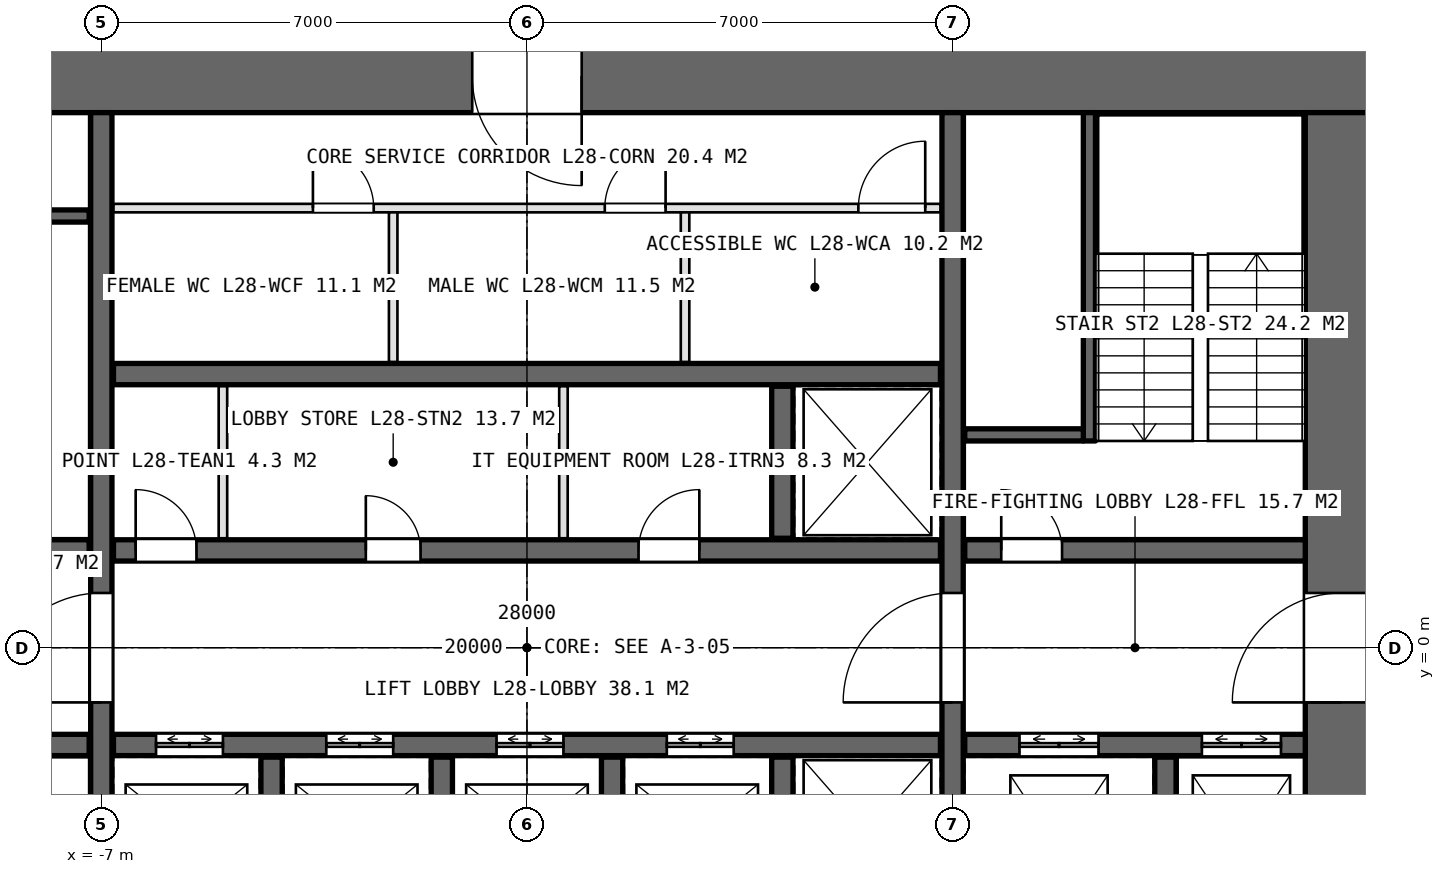
"""IFC4 building model, lengths in metres.
Left out: names, types, materials, properties, quantities, classifications, styles, units other than length and angle.
Written with IfcOpenShell. Run it as: python <this file> out.ifc"""

import sys

from ifc_helpers import new_model, si_unit, direction, frame, frame_2d, origin, place, context, subcontext, project, spatial, rectangle, extrude, element, fill, save


model = new_model("IFC4")
c1 = context("Model", 3, precision=1e-05, world=origin(), true_north=direction((0.0, 1.0)))
c2 = subcontext(c1, "Body", "Model", "MODEL_VIEW")
j1 = project(units=[si_unit("LENGTHUNIT", "METRE"), si_unit("PLANEANGLEUNIT", "RADIAN")], contexts=[c1])
p1 = place(None, origin())
s1 = spatial("IfcSite", under=j1, at=p1, CompositionType="ELEMENT")
p2 = place(p1, origin())
s2 = spatial("IfcBuilding", under=s1, at=p2, CompositionType="ELEMENT")
p3 = place(p2, frame((0.0, 0.0, 134.4)))
s3 = spatial("IfcBuildingStorey", under=s2, at=p3, CompositionType="ELEMENT", Elevation=134.4)
p4 = place(p3, frame((14.0, 9.4, 0.0), z_axis=(0.0, 0.0, 1.0), x_axis=(-1.0, 0.0, 0.0)))
e1 = element("IfcWall", 1, at=p4, inside=s3, PredefinedType="SHEAR", context=c2, shape_type="SweptSolid", body=[
    extrude(rectangle(XDim=28.0, YDim=1.2, at=frame_2d((14.0, 0.0))), origin(), (0.0, 0.0, 1.0), 4.2),
])
p5 = place(p4, frame((24.0, 0.0, 0.0)))
e2 = element("IfcOpeningElement", 2, at=p5, cuts=e1, PredefinedType="OPENING", context=c2, shape_type="SweptSolid", body=[
    extrude(rectangle(XDim=1.0, YDim=2.4, at=frame_2d((0.5, 1.2))), frame((0.0, 0.61, 0.0), z_axis=(0.0, -1.0, 0.0), x_axis=(1.0, 0.0, 0.0)), (0.0, 0.0, 1.0), 1.22),
])
p6 = place(p4, frame((13.1, 0.0, 0.0)))
e3 = element("IfcOpeningElement", 3, at=p6, cuts=e1, PredefinedType="OPENING", context=c2, shape_type="SweptSolid", body=[
    extrude(rectangle(XDim=1.8, YDim=2.4, at=frame_2d((0.9, 1.2))), frame((0.0, 0.61, 0.0), z_axis=(0.0, -1.0, 0.0), x_axis=(1.0, 0.0, 0.0)), (0.0, 0.0, 1.0), 1.22),
])
p7 = place(p3, frame((13.4, -8.8, 0.0), z_axis=(0.0, 0.0, 1.0), x_axis=(0.0, 1.0, 0.0)))
e4 = element("IfcWall", 4, at=p7, inside=s3, PredefinedType="SHEAR", context=c2, shape_type="SweptSolid", body=[
    extrude(rectangle(XDim=17.6, YDim=1.2, at=frame_2d((8.8, 0.0))), origin(), (0.0, 0.0, 1.0), 4.2),
])
p8 = place(p7, frame((7.9, 0.0, 0.0)))
e5 = element("IfcOpeningElement", 5, at=p8, cuts=e4, PredefinedType="OPENING", context=c2, shape_type="SweptSolid", body=[
    extrude(rectangle(XDim=1.8, YDim=2.4, at=frame_2d((0.9, 1.2))), frame((0.0, 0.61, 0.0), z_axis=(0.0, -1.0, 0.0), x_axis=(1.0, 0.0, 0.0)), (0.0, 0.0, 1.0), 1.22),
])
p9 = place(p3, frame((-7.0, -8.8, 0.0), z_axis=(0.0, 0.0, 1.0), x_axis=(0.0, 1.0, 0.0)))
e6 = element("IfcWall", 6, at=p9, inside=s3, PredefinedType="SHEAR", context=c2, shape_type="SweptSolid", body=[
    extrude(rectangle(XDim=17.6, YDim=0.35, at=frame_2d((8.8, 0.0))), origin(), (0.0, 0.0, 1.0), 4.2),
])
p10 = place(p9, frame((7.9, 0.0, 0.0)))
e7 = element("IfcOpeningElement", 7, at=p10, cuts=e6, PredefinedType="OPENING", context=c2, shape_type="SweptSolid", body=[
    extrude(rectangle(XDim=1.8, YDim=2.4, at=frame_2d((0.9, 1.2))), frame((0.0, 0.185, 0.0), z_axis=(0.0, -1.0, 0.0), x_axis=(1.0, 0.0, 0.0)), (0.0, 0.0, 1.0), 0.37),
])
p11 = place(p3, frame((7.0, -8.8, 0.0), z_axis=(0.0, 0.0, 1.0), x_axis=(0.0, 1.0, 0.0)))
e8 = element("IfcWall", 8, at=p11, inside=s3, PredefinedType="SHEAR", context=c2, shape_type="SweptSolid", body=[
    extrude(rectangle(XDim=17.6, YDim=0.35, at=frame_2d((8.8, 0.0))), origin(), (0.0, 0.0, 1.0), 4.2),
])
p12 = place(p11, frame((7.9, 0.0, 0.0)))
e9 = element("IfcOpeningElement", 9, at=p12, cuts=e8, PredefinedType="OPENING", context=c2, shape_type="SweptSolid", body=[
    extrude(rectangle(XDim=1.8, YDim=2.4, at=frame_2d((0.9, 1.2))), frame((0.0, 0.185, 0.0), z_axis=(0.0, -1.0, 0.0), x_axis=(1.0, 0.0, 0.0)), (0.0, 0.0, 1.0), 0.37),
])
p13 = place(p3, frame((-6.8, 1.6, 0.0), z_axis=(0.0, 0.0, 1.0), x_axis=(1.0, 0.0, 0.0)))
e10 = element("IfcWall", 10, at=p13, inside=s3, PredefinedType="SHEAR", context=c2, shape_type="SweptSolid", body=[
    extrude(rectangle(XDim=13.6, YDim=0.35, at=frame_2d((6.8, 0.0))), origin(), (0.0, 0.0, 1.0), 4.2),
])
p14 = place(p13, frame((0.365, 0.0, 0.0)))
e11 = element("IfcOpeningElement", 11, at=p14, cuts=e10, PredefinedType="OPENING", context=c2, shape_type="SweptSolid", body=[
    extrude(rectangle(XDim=1.0, YDim=2.4, at=frame_2d((0.5, 1.2))), frame((0.0, 0.185, 0.0), z_axis=(0.0, -1.0, 0.0), x_axis=(1.0, 0.0, 0.0)), (0.0, 0.0, 1.0), 0.37),
])
p15 = place(p13, frame((4.15, 0.0, 0.0)))
e12 = element("IfcOpeningElement", 12, at=p15, cuts=e10, PredefinedType="OPENING", context=c2, shape_type="SweptSolid", body=[
    extrude(rectangle(XDim=0.9, YDim=2.4, at=frame_2d((0.45, 1.2))), frame((0.0, 0.185, 0.0), z_axis=(0.0, -1.0, 0.0), x_axis=(1.0, 0.0, 0.0)), (0.0, 0.0, 1.0), 0.37),
])
p16 = place(p13, frame((8.635, 0.0, 0.0)))
e13 = element("IfcOpeningElement", 13, at=p16, cuts=e10, PredefinedType="OPENING", context=c2, shape_type="SweptSolid", body=[
    extrude(rectangle(XDim=1.0, YDim=2.4, at=frame_2d((0.5, 1.2))), frame((0.0, 0.185, 0.0), z_axis=(0.0, -1.0, 0.0), x_axis=(1.0, 0.0, 0.0)), (0.0, 0.0, 1.0), 0.37),
])
p17 = place(p3, frame((-6.8, -1.6, 0.0), z_axis=(0.0, 0.0, 1.0), x_axis=(1.0, 0.0, 0.0)))
e14 = element("IfcWall", 14, at=p17, inside=s3, PredefinedType="SHEAR", context=c2, shape_type="SweptSolid", body=[
    extrude(rectangle(XDim=13.6, YDim=0.35, at=frame_2d((6.8, 0.0))), origin(), (0.0, 0.0, 1.0), 4.2),
])
p18 = place(p17, frame((0.7, 0.0, 0.0)))
e15 = element("IfcOpeningElement", 15, at=p18, cuts=e14, PredefinedType="OPENING", context=c2, shape_type="SweptSolid", body=[
    extrude(rectangle(XDim=1.1, YDim=2.4, at=frame_2d((0.55, 1.2))), frame((0.0, 0.185, 0.0), z_axis=(0.0, -1.0, 0.0), x_axis=(1.0, 0.0, 0.0)), (0.0, 0.0, 1.0), 0.37),
])
p19 = place(p17, frame((3.5, 0.0, 0.0)))
e16 = element("IfcOpeningElement", 16, at=p19, cuts=e14, PredefinedType="OPENING", context=c2, shape_type="SweptSolid", body=[
    extrude(rectangle(XDim=1.1, YDim=2.4, at=frame_2d((0.55, 1.2))), frame((0.0, 0.185, 0.0), z_axis=(0.0, -1.0, 0.0), x_axis=(1.0, 0.0, 0.0)), (0.0, 0.0, 1.0), 0.37),
])
p20 = place(p17, frame((6.3, 0.0, 0.0)))
e17 = element("IfcOpeningElement", 17, at=p20, cuts=e14, PredefinedType="OPENING", context=c2, shape_type="SweptSolid", body=[
    extrude(rectangle(XDim=1.1, YDim=2.4, at=frame_2d((0.55, 1.2))), frame((0.0, 0.185, 0.0), z_axis=(0.0, -1.0, 0.0), x_axis=(1.0, 0.0, 0.0)), (0.0, 0.0, 1.0), 0.37),
])
p21 = place(p17, frame((9.1, 0.0, 0.0)))
e18 = element("IfcOpeningElement", 18, at=p21, cuts=e14, PredefinedType="OPENING", context=c2, shape_type="SweptSolid", body=[
    extrude(rectangle(XDim=1.1, YDim=2.4, at=frame_2d((0.55, 1.2))), frame((0.0, 0.185, 0.0), z_axis=(0.0, -1.0, 0.0), x_axis=(1.0, 0.0, 0.0)), (0.0, 0.0, 1.0), 0.37),
])
p22 = place(p3, frame((-6.8, 4.5, 0.0), z_axis=(0.0, 0.0, 1.0), x_axis=(1.0, 0.0, 0.0)))
e19 = element("IfcWall", 19, at=p22, inside=s3, PredefinedType="SHEAR", context=c2, shape_type="SweptSolid", body=[
    extrude(rectangle(XDim=13.6, YDim=0.35, at=frame_2d((6.8, 0.0))), origin(), (0.0, 0.0, 1.0), 4.2),
])
for number, where, z_axis, x_axis in (
    (20, (-12.8, 1.6, 0.0), (0.0, 0.0, 1.0), (1.0, 0.0, 0.0)),
    (21, (-12.8, -1.6, 0.0), (0.0, 0.0, 1.0), (1.0, 0.0, 0.0)),
):
    element("IfcWall", number, at=place(p3, frame(where, z_axis=z_axis, x_axis=x_axis)), inside=s3, PredefinedType="SHEAR", context=c2, shape_type="SweptSolid", body=[
        extrude(rectangle(XDim=5.6, YDim=0.35, at=frame_2d((2.8, 0.0))), origin(), (0.0, 0.0, 1.0), 4.2),
    ])
p23 = place(p3, frame((7.2, 1.6, 0.0), z_axis=(0.0, 0.0, 1.0), x_axis=(1.0, 0.0, 0.0)))
e22 = element("IfcWall", 22, at=p23, inside=s3, PredefinedType="SHEAR", context=c2, shape_type="SweptSolid", body=[
    extrude(rectangle(XDim=5.6, YDim=0.35, at=frame_2d((2.8, 0.0))), origin(), (0.0, 0.0, 1.0), 4.2),
])
p24 = place(p23, frame((0.6, 0.0, 0.0)))
e23 = element("IfcOpeningElement", 23, at=p24, cuts=e22, PredefinedType="OPENING", context=c2, shape_type="SweptSolid", body=[
    extrude(rectangle(XDim=1.0, YDim=2.4, at=frame_2d((0.5, 1.2))), frame((0.0, 0.185, 0.0), z_axis=(0.0, -1.0, 0.0), x_axis=(1.0, 0.0, 0.0)), (0.0, 0.0, 1.0), 0.37),
])
p25 = place(p3, frame((7.2, -1.6, 0.0), z_axis=(0.0, 0.0, 1.0), x_axis=(1.0, 0.0, 0.0)))
e24 = element("IfcWall", 24, at=p25, inside=s3, PredefinedType="SHEAR", context=c2, shape_type="SweptSolid", body=[
    extrude(rectangle(XDim=5.6, YDim=0.35, at=frame_2d((2.8, 0.0))), origin(), (0.0, 0.0, 1.0), 4.2),
])
p26 = place(p25, frame((0.9, 0.0, 0.0)))
e25 = element("IfcOpeningElement", 25, at=p26, cuts=e24, PredefinedType="OPENING", context=c2, shape_type="SweptSolid", body=[
    extrude(rectangle(XDim=1.3, YDim=2.4, at=frame_2d((0.65, 1.2))), frame((0.0, 0.185, 0.0), z_axis=(0.0, -1.0, 0.0), x_axis=(1.0, 0.0, 0.0)), (0.0, 0.0, 1.0), 0.37),
])
p27 = place(p25, frame((3.9, 0.0, 0.0)))
e26 = element("IfcOpeningElement", 26, at=p27, cuts=e24, PredefinedType="OPENING", context=c2, shape_type="SweptSolid", body=[
    extrude(rectangle(XDim=1.3, YDim=2.4, at=frame_2d((0.65, 1.2))), frame((0.0, 0.185, 0.0), z_axis=(0.0, -1.0, 0.0), x_axis=(1.0, 0.0, 0.0)), (0.0, 0.0, 1.0), 0.37),
])
p28 = place(p3, frame((10.5, -4.8, 0.0), z_axis=(0.0, 0.0, 1.0), x_axis=(0.0, 1.0, 0.0)))
e27 = element("IfcWall", 27, at=p28, inside=s3, PredefinedType="SHEAR", context=c2, shape_type="SweptSolid", body=[
    extrude(rectangle(XDim=3.0, YDim=0.35, at=frame_2d((1.5, 0.0))), origin(), (0.0, 0.0, 1.0), 4.2),
])
for number, where, z_axis, x_axis in (
    (28, (-4.2, -4.3, 0.0), (0.0, 0.0, 1.0), (0.0, 1.0, 0.0)),
    (29, (-1.4, -4.3, 0.0), (0.0, 0.0, 1.0), (0.0, 1.0, 0.0)),
    (30, (1.4, -4.3, 0.0), (0.0, 0.0, 1.0), (0.0, 1.0, 0.0)),
    (31, (4.2, 1.8, 0.0), (0.0, 0.0, 1.0), (0.0, 1.0, 0.0)),
    (32, (4.2, -4.3, 0.0), (0.0, 0.0, 1.0), (0.0, 1.0, 0.0)),
):
    element("IfcWall", number, at=place(p3, frame(where, z_axis=z_axis, x_axis=x_axis)), inside=s3, PredefinedType="SHEAR", context=c2, shape_type="SweptSolid", body=[
        extrude(rectangle(XDim=2.5, YDim=0.35, at=frame_2d((1.25, 0.0))), origin(), (0.0, 0.0, 1.0), 4.2),
    ])
p29 = place(p3, frame((-6.8, 7.23, 0.0), z_axis=(0.0, 0.0, 1.0), x_axis=(1.0, 0.0, 0.0)))
e33 = element("IfcWall", 33, at=p29, inside=s3, PredefinedType="PARTITIONING", context=c2, shape_type="SweptSolid", body=[
    extrude(rectangle(XDim=13.6, YDim=0.14, at=frame_2d((6.8, 0.0))), origin(), (0.0, 0.0, 1.0), 3.95),
])
p30 = place(p29, frame((3.28, 0.0, 0.0)))
e34 = element("IfcOpeningElement", 34, at=p30, cuts=e33, PredefinedType="OPENING", context=c2, shape_type="SweptSolid", body=[
    extrude(rectangle(XDim=1.0, YDim=2.4, at=frame_2d((0.5, 1.2))), frame((0.0, 0.08, 0.0), z_axis=(0.0, -1.0, 0.0), x_axis=(1.0, 0.0, 0.0)), (0.0, 0.0, 1.0), 0.16),
])
p31 = place(p29, frame((8.08, 0.0, 0.0)))
e35 = element("IfcOpeningElement", 35, at=p31, cuts=e33, PredefinedType="OPENING", context=c2, shape_type="SweptSolid", body=[
    extrude(rectangle(XDim=1.0, YDim=2.4, at=frame_2d((0.5, 1.2))), frame((0.0, 0.08, 0.0), z_axis=(0.0, -1.0, 0.0), x_axis=(1.0, 0.0, 0.0)), (0.0, 0.0, 1.0), 0.16),
])
p32 = place(p29, frame((12.25, 0.0, 0.0)))
e36 = element("IfcOpeningElement", 36, at=p32, cuts=e33, PredefinedType="OPENING", context=c2, shape_type="SweptSolid", body=[
    extrude(rectangle(XDim=1.1, YDim=2.4, at=frame_2d((0.55, 1.2))), frame((0.0, 0.08, 0.0), z_axis=(0.0, -1.0, 0.0), x_axis=(1.0, 0.0, 0.0)), (0.0, 0.0, 1.0), 0.16),
])
for number, where, z_axis, x_axis in (
    (37, (-2.2, 4.7, 0.0), (0.0, 0.0, 1.0), (0.0, 1.0, 0.0)),
    (38, (2.6, 4.7, 0.0), (0.0, 0.0, 1.0), (0.0, 1.0, 0.0)),
):
    element("IfcWall", number, at=place(p3, frame(where, z_axis=z_axis, x_axis=x_axis)), inside=s3, PredefinedType="PARTITIONING", context=c2, shape_type="SweptSolid", body=[
        extrude(rectangle(XDim=2.46, YDim=0.14, at=frame_2d((1.23, 0.0))), origin(), (0.0, 0.0, 1.0), 3.95),
    ])
for number, where, z_axis, x_axis in (
    (39, (-5.0, 1.8, 0.0), (0.0, 0.0, 1.0), (0.0, 1.0, 0.0)),
    (40, (0.6, 1.8, 0.0), (0.0, 0.0, 1.0), (0.0, 1.0, 0.0)),
):
    element("IfcWall", number, at=place(p3, frame(where, z_axis=z_axis, x_axis=x_axis)), inside=s3, PredefinedType="PARTITIONING", context=c2, shape_type="SweptSolid", body=[
        extrude(rectangle(XDim=2.5, YDim=0.14, at=frame_2d((1.25, 0.0))), origin(), (0.0, 0.0, 1.0), 3.95),
    ])
p33 = place(p3, frame((-9.15, 7.1, 0.0), z_axis=(0.0, 0.0, 1.0), x_axis=(1.0, 0.0, 0.0)))
e41 = element("IfcWall", 41, at=p33, inside=s3, PredefinedType="SOLIDWALL", context=c2, shape_type="SweptSolid", body=[
    extrude(rectangle(XDim=1.95, YDim=0.2, at=frame_2d((0.975, 0.0))), origin(), (0.0, 0.0, 1.0), 4.2),
])
p34 = place(p3, frame((9.25, 3.4, 0.0), z_axis=(0.0, 0.0, 1.0), x_axis=(0.0, 1.0, 0.0)))
e42 = element("IfcWall", 42, at=p34, inside=s3, PredefinedType="SOLIDWALL", context=c2, shape_type="SweptSolid", body=[
    extrude(rectangle(XDim=5.4, YDim=0.2, at=frame_2d((2.7, 0.0))), origin(), (0.0, 0.0, 1.0), 4.2),
])
p35 = place(p3, frame((9.15, 3.5, 0.0), z_axis=(0.0, 0.0, 1.0), x_axis=(-1.0, 0.0, 0.0)))
e43 = element("IfcWall", 43, at=p35, inside=s3, PredefinedType="SOLIDWALL", context=c2, shape_type="SweptSolid", body=[
    extrude(rectangle(XDim=1.95, YDim=0.2, at=frame_2d((0.975, 0.0))), origin(), (0.0, 0.0, 1.0), 4.2),
])
p36 = place(p8, origin())
e44 = element("IfcDoor", 44, at=p36, inside=s3, OperationType="DOUBLE_DOOR_SINGLE_SWING", PredefinedType="DOOR", context=c2, shape_type="SweptSolid", body=[
    extrude(rectangle(XDim=1.8, YDim=2.4, at=frame_2d((0.9, 1.2))), frame((0.0, 0.025, 0.0), z_axis=(0.0, -1.0, 0.0), x_axis=(1.0, 0.0, 0.0)), (0.0, 0.0, 1.0), 0.05),
])
fill(e5, e44)
p37 = place(p10, origin())
e45 = element("IfcDoor", 45, at=p37, inside=s3, OperationType="DOUBLE_DOOR_SINGLE_SWING", PredefinedType="DOOR", context=c2, shape_type="SweptSolid", body=[
    extrude(rectangle(XDim=1.8, YDim=2.4, at=frame_2d((0.9, 1.2))), frame((0.0, 0.025, 0.0), z_axis=(0.0, -1.0, 0.0), x_axis=(1.0, 0.0, 0.0)), (0.0, 0.0, 1.0), 0.05),
])
fill(e7, e45)
p38 = place(p12, origin())
e46 = element("IfcDoor", 46, at=p38, inside=s3, OperationType="DOUBLE_DOOR_SINGLE_SWING", PredefinedType="DOOR", context=c2, shape_type="SweptSolid", body=[
    extrude(rectangle(XDim=1.8, YDim=2.4, at=frame_2d((0.9, 1.2))), frame((0.0, 0.025, 0.0), z_axis=(0.0, -1.0, 0.0), x_axis=(1.0, 0.0, 0.0)), (0.0, 0.0, 1.0), 0.05),
])
fill(e9, e46)
p39 = place(p24, origin())
e47 = element("IfcDoor", 47, at=p39, inside=s3, OperationType="SINGLE_SWING_LEFT", PredefinedType="DOOR", context=c2, shape_type="SweptSolid", body=[
    extrude(rectangle(XDim=1.0, YDim=2.4, at=frame_2d((0.5, 1.2))), frame((0.0, 0.025, 0.0), z_axis=(0.0, -1.0, 0.0), x_axis=(1.0, 0.0, 0.0)), (0.0, 0.0, 1.0), 0.05),
])
fill(e23, e47)
p40 = place(p30, origin())
e48 = element("IfcDoor", 48, at=p40, inside=s3, OperationType="SINGLE_SWING_LEFT", PredefinedType="DOOR", context=c2, shape_type="SweptSolid", body=[
    extrude(rectangle(XDim=1.0, YDim=2.4, at=frame_2d((0.5, 1.2))), frame((0.0, 0.025, 0.0), z_axis=(0.0, -1.0, 0.0), x_axis=(1.0, 0.0, 0.0)), (0.0, 0.0, 1.0), 0.05),
])
fill(e34, e48)
p41 = place(p31, origin())
e49 = element("IfcDoor", 49, at=p41, inside=s3, OperationType="SINGLE_SWING_RIGHT", PredefinedType="DOOR", context=c2, shape_type="SweptSolid", body=[
    extrude(rectangle(XDim=1.0, YDim=2.4, at=frame_2d((0.5, 1.2))), frame((0.0, 0.025, 0.0), z_axis=(0.0, -1.0, 0.0), x_axis=(1.0, 0.0, 0.0)), (0.0, 0.0, 1.0), 0.05),
])
fill(e35, e49)
p42 = place(p32, origin())
e50 = element("IfcDoor", 50, at=p42, inside=s3, OperationType="SINGLE_SWING_RIGHT", PredefinedType="DOOR", context=c2, shape_type="SweptSolid", body=[
    extrude(rectangle(XDim=1.1, YDim=2.4, at=frame_2d((0.55, 1.2))), frame((0.0, 0.025, 0.0), z_axis=(0.0, -1.0, 0.0), x_axis=(1.0, 0.0, 0.0)), (0.0, 0.0, 1.0), 0.05),
])
fill(e36, e50)
p43 = place(p14, origin())
e51 = element("IfcDoor", 51, at=p43, inside=s3, OperationType="SINGLE_SWING_LEFT", PredefinedType="DOOR", context=c2, shape_type="SweptSolid", body=[
    extrude(rectangle(XDim=1.0, YDim=2.4, at=frame_2d((0.5, 1.2))), frame((0.0, 0.025, 0.0), z_axis=(0.0, -1.0, 0.0), x_axis=(1.0, 0.0, 0.0)), (0.0, 0.0, 1.0), 0.05),
])
fill(e11, e51)
p44 = place(p15, origin())
e52 = element("IfcDoor", 52, at=p44, inside=s3, OperationType="SINGLE_SWING_LEFT", PredefinedType="DOOR", context=c2, shape_type="SweptSolid", body=[
    extrude(rectangle(XDim=0.9, YDim=2.4, at=frame_2d((0.45, 1.2))), frame((0.0, 0.025, 0.0), z_axis=(0.0, -1.0, 0.0), x_axis=(1.0, 0.0, 0.0)), (0.0, 0.0, 1.0), 0.05),
])
fill(e12, e52)
p45 = place(p16, origin())
e53 = element("IfcDoor", 53, at=p45, inside=s3, OperationType="SINGLE_SWING_RIGHT", PredefinedType="DOOR", context=c2, shape_type="SweptSolid", body=[
    extrude(rectangle(XDim=1.0, YDim=2.4, at=frame_2d((0.5, 1.2))), frame((0.0, 0.025, 0.0), z_axis=(0.0, -1.0, 0.0), x_axis=(1.0, 0.0, 0.0)), (0.0, 0.0, 1.0), 0.05),
])
fill(e13, e53)
p46 = place(p6, origin())
e54 = element("IfcDoor", 54, at=p46, inside=s3, OperationType="DOUBLE_DOOR_SINGLE_SWING", PredefinedType="DOOR", context=c2, shape_type="SweptSolid", body=[
    extrude(rectangle(XDim=1.8, YDim=2.4, at=frame_2d((0.9, 1.2))), frame((0.0, 0.025, 0.0), z_axis=(0.0, -1.0, 0.0), x_axis=(1.0, 0.0, 0.0)), (0.0, 0.0, 1.0), 0.05),
])
fill(e3, e54)
p47 = place(p18, origin())
e55 = element("IfcDoor", 55, at=p47, inside=s3, OperationType="DOUBLE_DOOR_SLIDING", PredefinedType="DOOR", context=c2, shape_type="SweptSolid", body=[
    extrude(rectangle(XDim=1.1, YDim=2.4, at=frame_2d((0.55, 1.2))), frame((0.0, 0.025, 0.0), z_axis=(0.0, -1.0, 0.0), x_axis=(1.0, 0.0, 0.0)), (0.0, 0.0, 1.0), 0.05),
])
fill(e15, e55)
p48 = place(p19, origin())
e56 = element("IfcDoor", 56, at=p48, inside=s3, OperationType="DOUBLE_DOOR_SLIDING", PredefinedType="DOOR", context=c2, shape_type="SweptSolid", body=[
    extrude(rectangle(XDim=1.1, YDim=2.4, at=frame_2d((0.55, 1.2))), frame((0.0, 0.025, 0.0), z_axis=(0.0, -1.0, 0.0), x_axis=(1.0, 0.0, 0.0)), (0.0, 0.0, 1.0), 0.05),
])
fill(e16, e56)
p49 = place(p20, origin())
e57 = element("IfcDoor", 57, at=p49, inside=s3, OperationType="DOUBLE_DOOR_SLIDING", PredefinedType="DOOR", context=c2, shape_type="SweptSolid", body=[
    extrude(rectangle(XDim=1.1, YDim=2.4, at=frame_2d((0.55, 1.2))), frame((0.0, 0.025, 0.0), z_axis=(0.0, -1.0, 0.0), x_axis=(1.0, 0.0, 0.0)), (0.0, 0.0, 1.0), 0.05),
])
fill(e17, e57)
p50 = place(p21, origin())
e58 = element("IfcDoor", 58, at=p50, inside=s3, OperationType="DOUBLE_DOOR_SLIDING", PredefinedType="DOOR", context=c2, shape_type="SweptSolid", body=[
    extrude(rectangle(XDim=1.1, YDim=2.4, at=frame_2d((0.55, 1.2))), frame((0.0, 0.025, 0.0), z_axis=(0.0, -1.0, 0.0), x_axis=(1.0, 0.0, 0.0)), (0.0, 0.0, 1.0), 0.05),
])
fill(e18, e58)
p51 = place(p26, origin())
e59 = element("IfcDoor", 59, at=p51, inside=s3, OperationType="DOUBLE_DOOR_SLIDING", PredefinedType="DOOR", context=c2, shape_type="SweptSolid", body=[
    extrude(rectangle(XDim=1.3, YDim=2.4, at=frame_2d((0.65, 1.2))), frame((0.0, 0.025, 0.0), z_axis=(0.0, -1.0, 0.0), x_axis=(1.0, 0.0, 0.0)), (0.0, 0.0, 1.0), 0.05),
])
fill(e25, e59)
p52 = place(p27, origin())
e60 = element("IfcDoor", 60, at=p52, inside=s3, OperationType="DOUBLE_DOOR_SLIDING", PredefinedType="DOOR", context=c2, shape_type="SweptSolid", body=[
    extrude(rectangle(XDim=1.3, YDim=2.4, at=frame_2d((0.65, 1.2))), frame((0.0, 0.025, 0.0), z_axis=(0.0, -1.0, 0.0), x_axis=(1.0, 0.0, 0.0)), (0.0, 0.0, 1.0), 0.05),
])
fill(e26, e60)
save(model, sys.argv[1])
